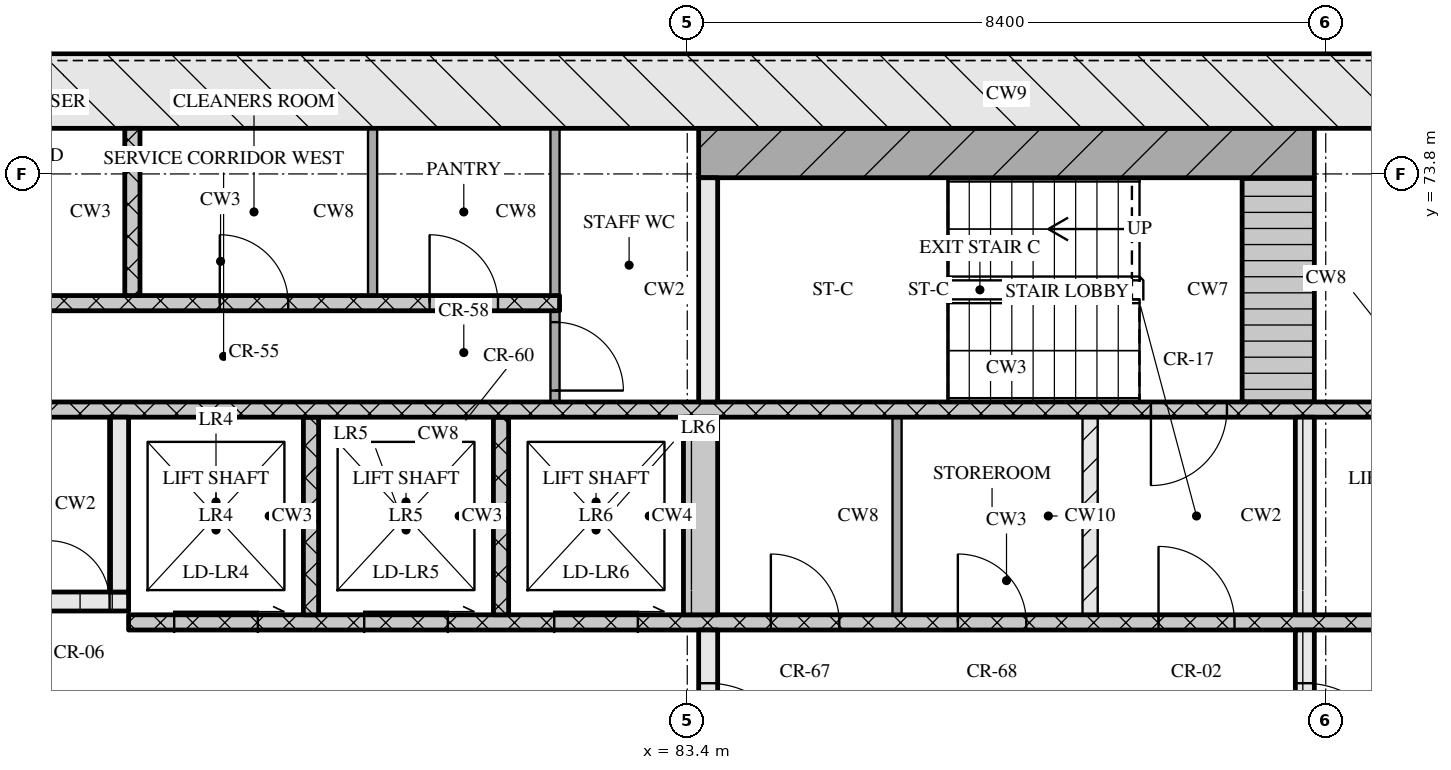
"""IFC4 building model, lengths in metres.
Left out: names, types, materials, properties, quantities, classifications, styles, units other than length and angle.
Written with IfcOpenShell. Run it as: python <this file> out.ifc"""

import sys

from ifc_helpers import new_model, si_unit, direction, frame, frame_2d, origin, place, context, subcontext, project, spatial, rectangle, extrude, element, fill, save


model = new_model("IFC4")
c1 = context("Model", 3, precision=1e-05, world=origin(), true_north=direction((0.0, 1.0)))
c2 = subcontext(c1, "Body", "Model", "MODEL_VIEW")
j1 = project(units=[si_unit("LENGTHUNIT", "METRE"), si_unit("PLANEANGLEUNIT", "RADIAN")], contexts=[c1])
p1 = place(None, origin())
s1 = spatial("IfcSite", under=j1, at=p1, CompositionType="ELEMENT")
p2 = place(p1, origin())
s2 = spatial("IfcBuilding", under=s1, at=p2, CompositionType="ELEMENT")
p3 = place(p2, frame((0.0, 0.0, 98.85)))
s3 = spatial("IfcBuildingStorey", under=s2, at=p3, CompositionType="ELEMENT", Elevation=98.85)
p4 = place(p3, frame((66.8, 74.9, 0.0), z_axis=(0.0, 0.0, 1.0), x_axis=(1.0, 0.0, 0.0)))
e1 = element("IfcWall", 1, at=p4, inside=s3, PredefinedType="SOLIDWALL", context=c2, shape_type="SweptSolid", body=[
    extrude(rectangle(XDim=41.6, YDim=1.0, at=frame_2d((20.8, 0.0))), origin(), (0.0, 0.0, 1.0), 3.32),
])
p5 = place(p3, frame((83.675, 65.2, 0.0), z_axis=(0.0, 0.0, 1.0), x_axis=(0.0, 1.0, 0.0)))
e2 = element("IfcWall", 2, at=p5, inside=s3, PredefinedType="SOLIDWALL", context=c2, shape_type="SweptSolid", body=[
    extrude(rectangle(XDim=2.6, YDim=0.25, at=frame_2d((1.3, 0.0))), origin(), (0.0, 0.0, 1.0), 3.32),
])
p6 = place(p5, frame((0.7, 0.0, 0.0)))
e3 = element("IfcOpeningElement", 3, at=p6, cuts=e2, PredefinedType="OPENING", context=c2, shape_type="SweptSolid", body=[
    extrude(rectangle(XDim=1.2, YDim=2.1, at=frame_2d((0.6, 1.05))), frame((0.0, 0.135, 0.0), z_axis=(0.0, -1.0, 0.0), x_axis=(1.0, 0.0, 0.0)), (0.0, 0.0, 1.0), 0.27),
])
p7 = place(p3, frame((91.525, 65.2, 0.0), z_axis=(0.0, 0.0, 1.0), x_axis=(0.0, 1.0, 0.0)))
e4 = element("IfcWall", 4, at=p7, inside=s3, PredefinedType="SOLIDWALL", context=c2, shape_type="SweptSolid", body=[
    extrude(rectangle(XDim=2.6, YDim=0.25, at=frame_2d((1.3, 0.0))), origin(), (0.0, 0.0, 1.0), 3.32),
])
p8 = place(p7, frame((0.7, 0.0, 0.0)))
e5 = element("IfcOpeningElement", 5, at=p8, cuts=e4, PredefinedType="OPENING", context=c2, shape_type="SweptSolid", body=[
    extrude(rectangle(XDim=1.2, YDim=2.1, at=frame_2d((0.6, 1.05))), frame((0.0, 0.135, 0.0), z_axis=(0.0, -1.0, 0.0), x_axis=(1.0, 0.0, 0.0)), (0.0, 0.0, 1.0), 0.27),
])
p9 = place(p3, frame((76.05, 67.9, 0.0), z_axis=(0.0, 0.0, 1.0), x_axis=(1.0, 0.0, 0.0)))
e6 = element("IfcWall", 6, at=p9, inside=s3, PredefinedType="SOLIDWALL", context=c2, shape_type="SweptSolid", body=[
    extrude(rectangle(XDim=23.1, YDim=0.2, at=frame_2d((11.55, 0.0))), origin(), (0.0, 0.0, 1.0), 3.32),
])
p10 = place(p9, frame((0.6, 0.0, 0.0)))
e7 = element("IfcOpeningElement", 7, at=p10, cuts=e6, PredefinedType="OPENING", context=c2, shape_type="SweptSolid", body=[
    extrude(rectangle(XDim=1.1, YDim=2.1, at=frame_2d((0.55, 1.05))), frame((0.0, 0.11, 0.0), z_axis=(0.0, -1.0, 0.0), x_axis=(1.0, 0.0, 0.0)), (0.0, 0.0, 1.0), 0.22),
])
p11 = place(p9, frame((3.1, 0.0, 0.0)))
e8 = element("IfcOpeningElement", 8, at=p11, cuts=e6, PredefinedType="OPENING", context=c2, shape_type="SweptSolid", body=[
    extrude(rectangle(XDim=1.1, YDim=2.1, at=frame_2d((0.55, 1.05))), frame((0.0, 0.11, 0.0), z_axis=(0.0, -1.0, 0.0), x_axis=(1.0, 0.0, 0.0)), (0.0, 0.0, 1.0), 0.22),
])
p12 = place(p9, frame((5.6, 0.0, 0.0)))
e9 = element("IfcOpeningElement", 9, at=p12, cuts=e6, PredefinedType="OPENING", context=c2, shape_type="SweptSolid", body=[
    extrude(rectangle(XDim=1.1, YDim=2.1, at=frame_2d((0.55, 1.05))), frame((0.0, 0.11, 0.0), z_axis=(0.0, -1.0, 0.0), x_axis=(1.0, 0.0, 0.0)), (0.0, 0.0, 1.0), 0.22),
])
p13 = place(p9, frame((8.45, 0.0, 0.0)))
e10 = element("IfcOpeningElement", 10, at=p13, cuts=e6, PredefinedType="OPENING", context=c2, shape_type="SweptSolid", body=[
    extrude(rectangle(XDim=0.9, YDim=2.1, at=frame_2d((0.45, 1.05))), frame((0.0, 0.11, 0.0), z_axis=(0.0, -1.0, 0.0), x_axis=(1.0, 0.0, 0.0)), (0.0, 0.0, 1.0), 0.22),
])
p14 = place(p9, frame((10.91, 0.0, 0.0)))
e11 = element("IfcOpeningElement", 11, at=p14, cuts=e6, PredefinedType="OPENING", context=c2, shape_type="SweptSolid", body=[
    extrude(rectangle(XDim=0.9, YDim=2.1, at=frame_2d((0.45, 1.05))), frame((0.0, 0.11, 0.0), z_axis=(0.0, -1.0, 0.0), x_axis=(1.0, 0.0, 0.0)), (0.0, 0.0, 1.0), 0.22),
])
p15 = place(p9, frame((13.55, 0.0, 0.0)))
e12 = element("IfcOpeningElement", 12, at=p15, cuts=e6, PredefinedType="OPENING", context=c2, shape_type="SweptSolid", body=[
    extrude(rectangle(XDim=1.0, YDim=2.1, at=frame_2d((0.5, 1.05))), frame((0.0, 0.11, 0.0), z_axis=(0.0, -1.0, 0.0), x_axis=(1.0, 0.0, 0.0)), (0.0, 0.0, 1.0), 0.22),
])
for number, where, z_axis, x_axis in (
    (13, (78.45, 68.0, 0.0), (0.0, 0.0, 1.0), (0.0, 1.0, 0.0)),
    (14, (80.95, 68.0, 0.0), (0.0, 0.0, 1.0), (0.0, 1.0, 0.0)),
):
    element("IfcWall", number, at=place(p3, frame(where, z_axis=z_axis, x_axis=x_axis)), inside=s3, PredefinedType="SOLIDWALL", context=c2, shape_type="SweptSolid", body=[
        extrude(rectangle(XDim=2.6, YDim=0.2, at=frame_2d((1.3, 0.0))), origin(), (0.0, 0.0, 1.0), 3.32),
    ])
p16 = place(p3, frame((83.575, 68.0, 0.0), z_axis=(0.0, 0.0, 1.0), x_axis=(0.0, 1.0, 0.0)))
e15 = element("IfcWall", 15, at=p16, inside=s3, PredefinedType="SOLIDWALL", context=c2, shape_type="SweptSolid", body=[
    extrude(rectangle(XDim=2.6, YDim=0.45, at=frame_2d((1.3, 0.0))), origin(), (0.0, 0.0, 1.0), 3.32),
])
p17 = place(p3, frame((86.16, 68.0, 0.0), z_axis=(0.0, 0.0, 1.0), x_axis=(0.0, 1.0, 0.0)))
e16 = element("IfcWall", 16, at=p17, inside=s3, PredefinedType="PARTITIONING", context=c2, shape_type="SweptSolid", body=[
    extrude(rectangle(XDim=2.6, YDim=0.12, at=frame_2d((1.3, 0.0))), origin(), (0.0, 0.0, 1.0), 3.32),
])
p18 = place(p3, frame((88.7, 68.0, 0.0), z_axis=(0.0, 0.0, 1.0), x_axis=(0.0, 1.0, 0.0)))
e17 = element("IfcWall", 17, at=p18, inside=s3, PredefinedType="PARTITIONING", context=c2, shape_type="SweptSolid", body=[
    extrude(rectangle(XDim=2.6, YDim=0.2, at=frame_2d((1.3, 0.0))), origin(), (0.0, 0.0, 1.0), 3.32),
])
p19 = place(p3, frame((91.525, 68.0, 0.0), z_axis=(0.0, 0.0, 1.0), x_axis=(0.0, 1.0, 0.0)))
e18 = element("IfcWall", 18, at=p19, inside=s3, PredefinedType="SOLIDWALL", context=c2, shape_type="SweptSolid", body=[
    extrude(rectangle(XDim=2.6, YDim=0.25, at=frame_2d((1.3, 0.0))), origin(), (0.0, 0.0, 1.0), 3.32),
])
p20 = place(p3, frame((67.8, 68.175, 0.0), z_axis=(0.0, 0.0, 1.0), x_axis=(1.0, 0.0, 0.0)))
e19 = element("IfcWall", 19, at=p20, inside=s3, PredefinedType="SOLIDWALL", context=c2, shape_type="SweptSolid", body=[
    extrude(rectangle(XDim=8.25, YDim=0.25, at=frame_2d((4.125, 0.0))), origin(), (0.0, 0.0, 1.0), 3.32),
])
p21 = place(p20, frame((5.7, 0.0, 0.0)))
e20 = element("IfcOpeningElement", 20, at=p21, cuts=e19, PredefinedType="OPENING", context=c2, shape_type="SweptSolid", body=[
    extrude(rectangle(XDim=1.0, YDim=2.1, at=frame_2d((0.5, 1.05))), frame((0.0, 0.135, 0.0), z_axis=(0.0, -1.0, 0.0), x_axis=(1.0, 0.0, 0.0)), (0.0, 0.0, 1.0), 0.27),
])
p22 = place(p20, frame((7.2, 0.0, 0.0)))
e21 = element("IfcOpeningElement", 21, at=p22, cuts=e19, PredefinedType="OPENING", context=c2, shape_type="SweptSolid", body=[
    extrude(rectangle(XDim=0.8, YDim=2.1, at=frame_2d((0.4, 1.05))), frame((0.0, 0.135, 0.0), z_axis=(0.0, -1.0, 0.0), x_axis=(1.0, 0.0, 0.0)), (0.0, 0.0, 1.0), 0.27),
])
p23 = place(p3, frame((75.925, 68.3, 0.0), z_axis=(0.0, 0.0, 1.0), x_axis=(0.0, 1.0, 0.0)))
e22 = element("IfcWall", 22, at=p23, inside=s3, PredefinedType="SOLIDWALL", context=c2, shape_type="SweptSolid", body=[
    extrude(rectangle(XDim=2.3, YDim=0.25, at=frame_2d((1.15, 0.0))), origin(), (0.0, 0.0, 1.0), 3.32),
])
p24 = place(p3, frame((67.8, 70.7, 0.0), z_axis=(0.0, 0.0, 1.0), x_axis=(1.0, 0.0, 0.0)))
e23 = element("IfcWall", 23, at=p24, inside=s3, PredefinedType="SOLIDWALL", context=c2, shape_type="SweptSolid", body=[
    extrude(rectangle(XDim=39.6, YDim=0.2, at=frame_2d((19.8, 0.0))), origin(), (0.0, 0.0, 1.0), 3.32),
])
p25 = place(p24, frame((0.65, 0.0, 0.0)))
e24 = element("IfcOpeningElement", 24, at=p25, cuts=e23, PredefinedType="OPENING", context=c2, shape_type="SweptSolid", body=[
    extrude(rectangle(XDim=1.1, YDim=2.1, at=frame_2d((0.55, 1.05))), frame((0.0, 0.11, 0.0), z_axis=(0.0, -1.0, 0.0), x_axis=(1.0, 0.0, 0.0)), (0.0, 0.0, 1.0), 0.22),
])
p26 = place(p24, frame((3.25, 0.0, 0.0)))
e25 = element("IfcOpeningElement", 25, at=p26, cuts=e23, PredefinedType="OPENING", context=c2, shape_type="SweptSolid", body=[
    extrude(rectangle(XDim=1.1, YDim=2.1, at=frame_2d((0.55, 1.05))), frame((0.0, 0.11, 0.0), z_axis=(0.0, -1.0, 0.0), x_axis=(1.0, 0.0, 0.0)), (0.0, 0.0, 1.0), 0.22),
])
p27 = place(p24, frame((5.9, 0.0, 0.0)))
e26 = element("IfcOpeningElement", 26, at=p27, cuts=e23, PredefinedType="OPENING", context=c2, shape_type="SweptSolid", body=[
    extrude(rectangle(XDim=1.0, YDim=2.1, at=frame_2d((0.5, 1.05))), frame((0.0, 0.11, 0.0), z_axis=(0.0, -1.0, 0.0), x_axis=(1.0, 0.0, 0.0)), (0.0, 0.0, 1.0), 0.22),
])
p28 = place(p24, frame((21.7, 0.0, 0.0)))
e27 = element("IfcOpeningElement", 27, at=p28, cuts=e23, PredefinedType="OPENING", context=c2, shape_type="SweptSolid", body=[
    extrude(rectangle(XDim=1.0, YDim=2.1, at=frame_2d((0.5, 1.05))), frame((0.0, 0.11, 0.0), z_axis=(0.0, -1.0, 0.0), x_axis=(1.0, 0.0, 0.0)), (0.0, 0.0, 1.0), 0.22),
])
p29 = place(p24, frame((32.7, 0.0, 0.0)))
e28 = element("IfcOpeningElement", 28, at=p29, cuts=e23, PredefinedType="OPENING", context=c2, shape_type="SweptSolid", body=[
    extrude(rectangle(XDim=1.0, YDim=2.1, at=frame_2d((0.5, 1.05))), frame((0.0, 0.11, 0.0), z_axis=(0.0, -1.0, 0.0), x_axis=(1.0, 0.0, 0.0)), (0.0, 0.0, 1.0), 0.22),
])
p30 = place(p24, frame((35.25, 0.0, 0.0)))
e29 = element("IfcOpeningElement", 29, at=p30, cuts=e23, PredefinedType="OPENING", context=c2, shape_type="SweptSolid", body=[
    extrude(rectangle(XDim=1.1, YDim=2.1, at=frame_2d((0.55, 1.05))), frame((0.0, 0.11, 0.0), z_axis=(0.0, -1.0, 0.0), x_axis=(1.0, 0.0, 0.0)), (0.0, 0.0, 1.0), 0.22),
])
p31 = place(p24, frame((37.85, 0.0, 0.0)))
e30 = element("IfcOpeningElement", 30, at=p31, cuts=e23, PredefinedType="OPENING", context=c2, shape_type="SweptSolid", body=[
    extrude(rectangle(XDim=1.1, YDim=2.1, at=frame_2d((0.55, 1.05))), frame((0.0, 0.11, 0.0), z_axis=(0.0, -1.0, 0.0), x_axis=(1.0, 0.0, 0.0)), (0.0, 0.0, 1.0), 0.22),
])
p32 = place(p3, frame((81.66, 70.8, 0.0), z_axis=(0.0, 0.0, 1.0), x_axis=(0.0, 1.0, 0.0)))
e31 = element("IfcWall", 31, at=p32, inside=s3, PredefinedType="PARTITIONING", context=c2, shape_type="SweptSolid", body=[
    extrude(rectangle(XDim=1.2, YDim=0.12, at=frame_2d((0.6, 0.0))), origin(), (0.0, 0.0, 1.0), 3.32),
])
p33 = place(p32, frame((0.15, 0.0, 0.0)))
e32 = element("IfcOpeningElement", 32, at=p33, cuts=e31, PredefinedType="OPENING", context=c2, shape_type="SweptSolid", body=[
    extrude(rectangle(XDim=0.9, YDim=2.1, at=frame_2d((0.45, 1.05))), frame((0.0, 0.07, 0.0), z_axis=(0.0, -1.0, 0.0), x_axis=(1.0, 0.0, 0.0)), (0.0, 0.0, 1.0), 0.14),
])
p34 = place(p3, frame((83.675, 70.8, 0.0), z_axis=(0.0, 0.0, 1.0), x_axis=(0.0, 1.0, 0.0)))
e33 = element("IfcWall", 33, at=p34, inside=s3, PredefinedType="SOLIDWALL", context=c2, shape_type="SweptSolid", body=[
    extrude(rectangle(XDim=2.95, YDim=0.25, at=frame_2d((1.475, 0.0))), origin(), (0.0, 0.0, 1.0), 3.32),
])
p35 = place(p3, frame((91.175, 70.8, 0.0), z_axis=(0.0, 0.0, 1.0), x_axis=(0.0, 1.0, 0.0)))
e34 = element("IfcWall", 34, at=p35, inside=s3, PredefinedType="SOLIDWALL", context=c2, shape_type="SweptSolid", body=[
    extrude(rectangle(XDim=2.95, YDim=0.95, at=frame_2d((1.475, 0.0))), origin(), (0.0, 0.0, 1.0), 3.32),
])
p36 = place(p3, frame((72.8, 72.1, 0.0), z_axis=(0.0, 0.0, 1.0), x_axis=(1.0, 0.0, 0.0)))
e35 = element("IfcWall", 35, at=p36, inside=s3, PredefinedType="SOLIDWALL", context=c2, shape_type="SweptSolid", body=[
    extrude(rectangle(XDim=8.92, YDim=0.2, at=frame_2d((4.46, 0.0))), origin(), (0.0, 0.0, 1.0), 3.32),
])
p37 = place(p36, frame((1.25, 0.0, 0.0)))
e36 = element("IfcOpeningElement", 36, at=p37, cuts=e35, PredefinedType="OPENING", context=c2, shape_type="SweptSolid", body=[
    extrude(rectangle(XDim=0.9, YDim=2.1, at=frame_2d((0.45, 1.05))), frame((0.0, 0.11, 0.0), z_axis=(0.0, -1.0, 0.0), x_axis=(1.0, 0.0, 0.0)), (0.0, 0.0, 1.0), 0.22),
])
p38 = place(p36, frame((4.45, 0.0, 0.0)))
e37 = element("IfcOpeningElement", 37, at=p38, cuts=e35, PredefinedType="OPENING", context=c2, shape_type="SweptSolid", body=[
    extrude(rectangle(XDim=0.9, YDim=2.1, at=frame_2d((0.45, 1.05))), frame((0.0, 0.11, 0.0), z_axis=(0.0, -1.0, 0.0), x_axis=(1.0, 0.0, 0.0)), (0.0, 0.0, 1.0), 0.22),
])
p39 = place(p36, frame((7.21, 0.0, 0.0)))
e38 = element("IfcOpeningElement", 38, at=p39, cuts=e35, PredefinedType="OPENING", context=c2, shape_type="SweptSolid", body=[
    extrude(rectangle(XDim=0.9, YDim=2.1, at=frame_2d((0.45, 1.05))), frame((0.0, 0.11, 0.0), z_axis=(0.0, -1.0, 0.0), x_axis=(1.0, 0.0, 0.0)), (0.0, 0.0, 1.0), 0.22),
])
p40 = place(p3, frame((76.1, 72.2, 0.0), z_axis=(0.0, 0.0, 1.0), x_axis=(0.0, 1.0, 0.0)))
e39 = element("IfcWall", 39, at=p40, inside=s3, PredefinedType="SOLIDWALL", context=c2, shape_type="SweptSolid", body=[
    extrude(rectangle(XDim=2.2, YDim=0.2, at=frame_2d((1.1, 0.0))), origin(), (0.0, 0.0, 1.0), 3.32),
])
for number, where, z_axis, x_axis in (
    (40, (79.26, 72.2, 0.0), (0.0, 0.0, 1.0), (0.0, 1.0, 0.0)),
    (41, (81.66, 72.2, 0.0), (0.0, 0.0, 1.0), (0.0, 1.0, 0.0)),
):
    element("IfcWall", number, at=place(p3, frame(where, z_axis=z_axis, x_axis=x_axis)), inside=s3, PredefinedType="PARTITIONING", context=c2, shape_type="SweptSolid", body=[
        extrude(rectangle(XDim=2.2, YDim=0.12, at=frame_2d((1.1, 0.0))), origin(), (0.0, 0.0, 1.0), 3.32),
    ])
p41 = place(p3, frame((83.55, 74.075, 0.0), z_axis=(0.0, 0.0, 1.0), x_axis=(1.0, 0.0, 0.0)))
e42 = element("IfcWall", 42, at=p41, inside=s3, PredefinedType="SOLIDWALL", context=c2, shape_type="SweptSolid", body=[
    extrude(rectangle(XDim=8.1, YDim=0.65, at=frame_2d((4.05, 0.0))), origin(), (0.0, 0.0, 1.0), 3.32),
])
p42 = place(p6, origin())
e43 = element("IfcDoor", 43, at=p42, inside=s3, OperationType="SINGLE_SWING_RIGHT", PredefinedType="DOOR", context=c2, shape_type="SweptSolid", body=[
    extrude(rectangle(XDim=1.2, YDim=2.1, at=frame_2d((0.6, 1.05))), frame((0.0, 0.025, 0.0), z_axis=(0.0, -1.0, 0.0), x_axis=(1.0, 0.0, 0.0)), (0.0, 0.0, 1.0), 0.05),
])
fill(e3, e43)
p43 = place(p8, origin())
e44 = element("IfcDoor", 44, at=p43, inside=s3, OperationType="SINGLE_SWING_RIGHT", PredefinedType="DOOR", context=c2, shape_type="SweptSolid", body=[
    extrude(rectangle(XDim=1.2, YDim=2.1, at=frame_2d((0.6, 1.05))), frame((0.0, 0.025, 0.0), z_axis=(0.0, -1.0, 0.0), x_axis=(1.0, 0.0, 0.0)), (0.0, 0.0, 1.0), 0.05),
])
fill(e5, e44)
p44 = place(p10, origin())
e45 = element("IfcDoor", 45, at=p44, inside=s3, OperationType="SLIDING_TO_RIGHT", PredefinedType="DOOR", context=c2, shape_type="SweptSolid", body=[
    extrude(rectangle(XDim=1.1, YDim=2.1, at=frame_2d((0.55, 1.05))), frame((0.0, 0.025, 0.0), z_axis=(0.0, -1.0, 0.0), x_axis=(1.0, 0.0, 0.0)), (0.0, 0.0, 1.0), 0.05),
])
fill(e7, e45)
p45 = place(p11, origin())
e46 = element("IfcDoor", 46, at=p45, inside=s3, OperationType="SLIDING_TO_RIGHT", PredefinedType="DOOR", context=c2, shape_type="SweptSolid", body=[
    extrude(rectangle(XDim=1.1, YDim=2.1, at=frame_2d((0.55, 1.05))), frame((0.0, 0.025, 0.0), z_axis=(0.0, -1.0, 0.0), x_axis=(1.0, 0.0, 0.0)), (0.0, 0.0, 1.0), 0.05),
])
fill(e8, e46)
p46 = place(p12, origin())
e47 = element("IfcDoor", 47, at=p46, inside=s3, OperationType="SLIDING_TO_RIGHT", PredefinedType="DOOR", context=c2, shape_type="SweptSolid", body=[
    extrude(rectangle(XDim=1.1, YDim=2.1, at=frame_2d((0.55, 1.05))), frame((0.0, 0.025, 0.0), z_axis=(0.0, -1.0, 0.0), x_axis=(1.0, 0.0, 0.0)), (0.0, 0.0, 1.0), 0.05),
])
fill(e9, e47)
p47 = place(p13, origin())
e48 = element("IfcDoor", 48, at=p47, inside=s3, OperationType="SINGLE_SWING_LEFT", PredefinedType="DOOR", context=c2, shape_type="SweptSolid", body=[
    extrude(rectangle(XDim=0.9, YDim=2.1, at=frame_2d((0.45, 1.05))), frame((0.0, 0.025, 0.0), z_axis=(0.0, -1.0, 0.0), x_axis=(1.0, 0.0, 0.0)), (0.0, 0.0, 1.0), 0.05),
])
fill(e10, e48)
p48 = place(p14, origin())
e49 = element("IfcDoor", 49, at=p48, inside=s3, OperationType="SINGLE_SWING_LEFT", PredefinedType="DOOR", context=c2, shape_type="SweptSolid", body=[
    extrude(rectangle(XDim=0.9, YDim=2.1, at=frame_2d((0.45, 1.05))), frame((0.0, 0.025, 0.0), z_axis=(0.0, -1.0, 0.0), x_axis=(1.0, 0.0, 0.0)), (0.0, 0.0, 1.0), 0.05),
])
fill(e11, e49)
p49 = place(p15, origin())
e50 = element("IfcDoor", 50, at=p49, inside=s3, OperationType="SINGLE_SWING_LEFT", PredefinedType="DOOR", context=c2, shape_type="SweptSolid", body=[
    extrude(rectangle(XDim=1.0, YDim=2.1, at=frame_2d((0.5, 1.05))), frame((0.0, 0.025, 0.0), z_axis=(0.0, -1.0, 0.0), x_axis=(1.0, 0.0, 0.0)), (0.0, 0.0, 1.0), 0.05),
])
fill(e12, e50)
p50 = place(p22, origin())
e51 = element("IfcDoor", 51, at=p50, inside=s3, OperationType="SINGLE_SWING_LEFT", PredefinedType="DOOR", context=c2, shape_type="SweptSolid", body=[
    extrude(rectangle(XDim=0.8, YDim=2.1, at=frame_2d((0.4, 1.05))), frame((0.0, 0.025, 0.0), z_axis=(0.0, -1.0, 0.0), x_axis=(1.0, 0.0, 0.0)), (0.0, 0.0, 1.0), 0.05),
])
fill(e21, e51)
p51 = place(p28, origin())
e52 = element("IfcDoor", 52, at=p51, inside=s3, OperationType="SINGLE_SWING_RIGHT", PredefinedType="DOOR", context=c2, shape_type="SweptSolid", body=[
    extrude(rectangle(XDim=1.0, YDim=2.1, at=frame_2d((0.5, 1.05))), frame((0.0, 0.025, 0.0), z_axis=(0.0, -1.0, 0.0), x_axis=(1.0, 0.0, 0.0)), (0.0, 0.0, 1.0), 0.05),
])
fill(e27, e52)
p52 = place(p33, origin())
e53 = element("IfcDoor", 53, at=p52, inside=s3, OperationType="SINGLE_SWING_RIGHT", PredefinedType="DOOR", context=c2, shape_type="SweptSolid", body=[
    extrude(rectangle(XDim=0.9, YDim=2.1, at=frame_2d((0.45, 1.05))), frame((0.0, 0.025, 0.0), z_axis=(0.0, -1.0, 0.0), x_axis=(1.0, 0.0, 0.0)), (0.0, 0.0, 1.0), 0.05),
])
fill(e32, e53)
p53 = place(p38, origin())
e54 = element("IfcDoor", 54, at=p53, inside=s3, OperationType="SINGLE_SWING_LEFT", PredefinedType="DOOR", context=c2, shape_type="SweptSolid", body=[
    extrude(rectangle(XDim=0.9, YDim=2.1, at=frame_2d((0.45, 1.05))), frame((0.0, 0.025, 0.0), z_axis=(0.0, -1.0, 0.0), x_axis=(1.0, 0.0, 0.0)), (0.0, 0.0, 1.0), 0.05),
])
fill(e37, e54)
p54 = place(p39, origin())
e55 = element("IfcDoor", 55, at=p54, inside=s3, OperationType="SINGLE_SWING_LEFT", PredefinedType="DOOR", context=c2, shape_type="SweptSolid", body=[
    extrude(rectangle(XDim=0.9, YDim=2.1, at=frame_2d((0.45, 1.05))), frame((0.0, 0.025, 0.0), z_axis=(0.0, -1.0, 0.0), x_axis=(1.0, 0.0, 0.0)), (0.0, 0.0, 1.0), 0.05),
])
fill(e38, e55)
save(model, sys.argv[1])
